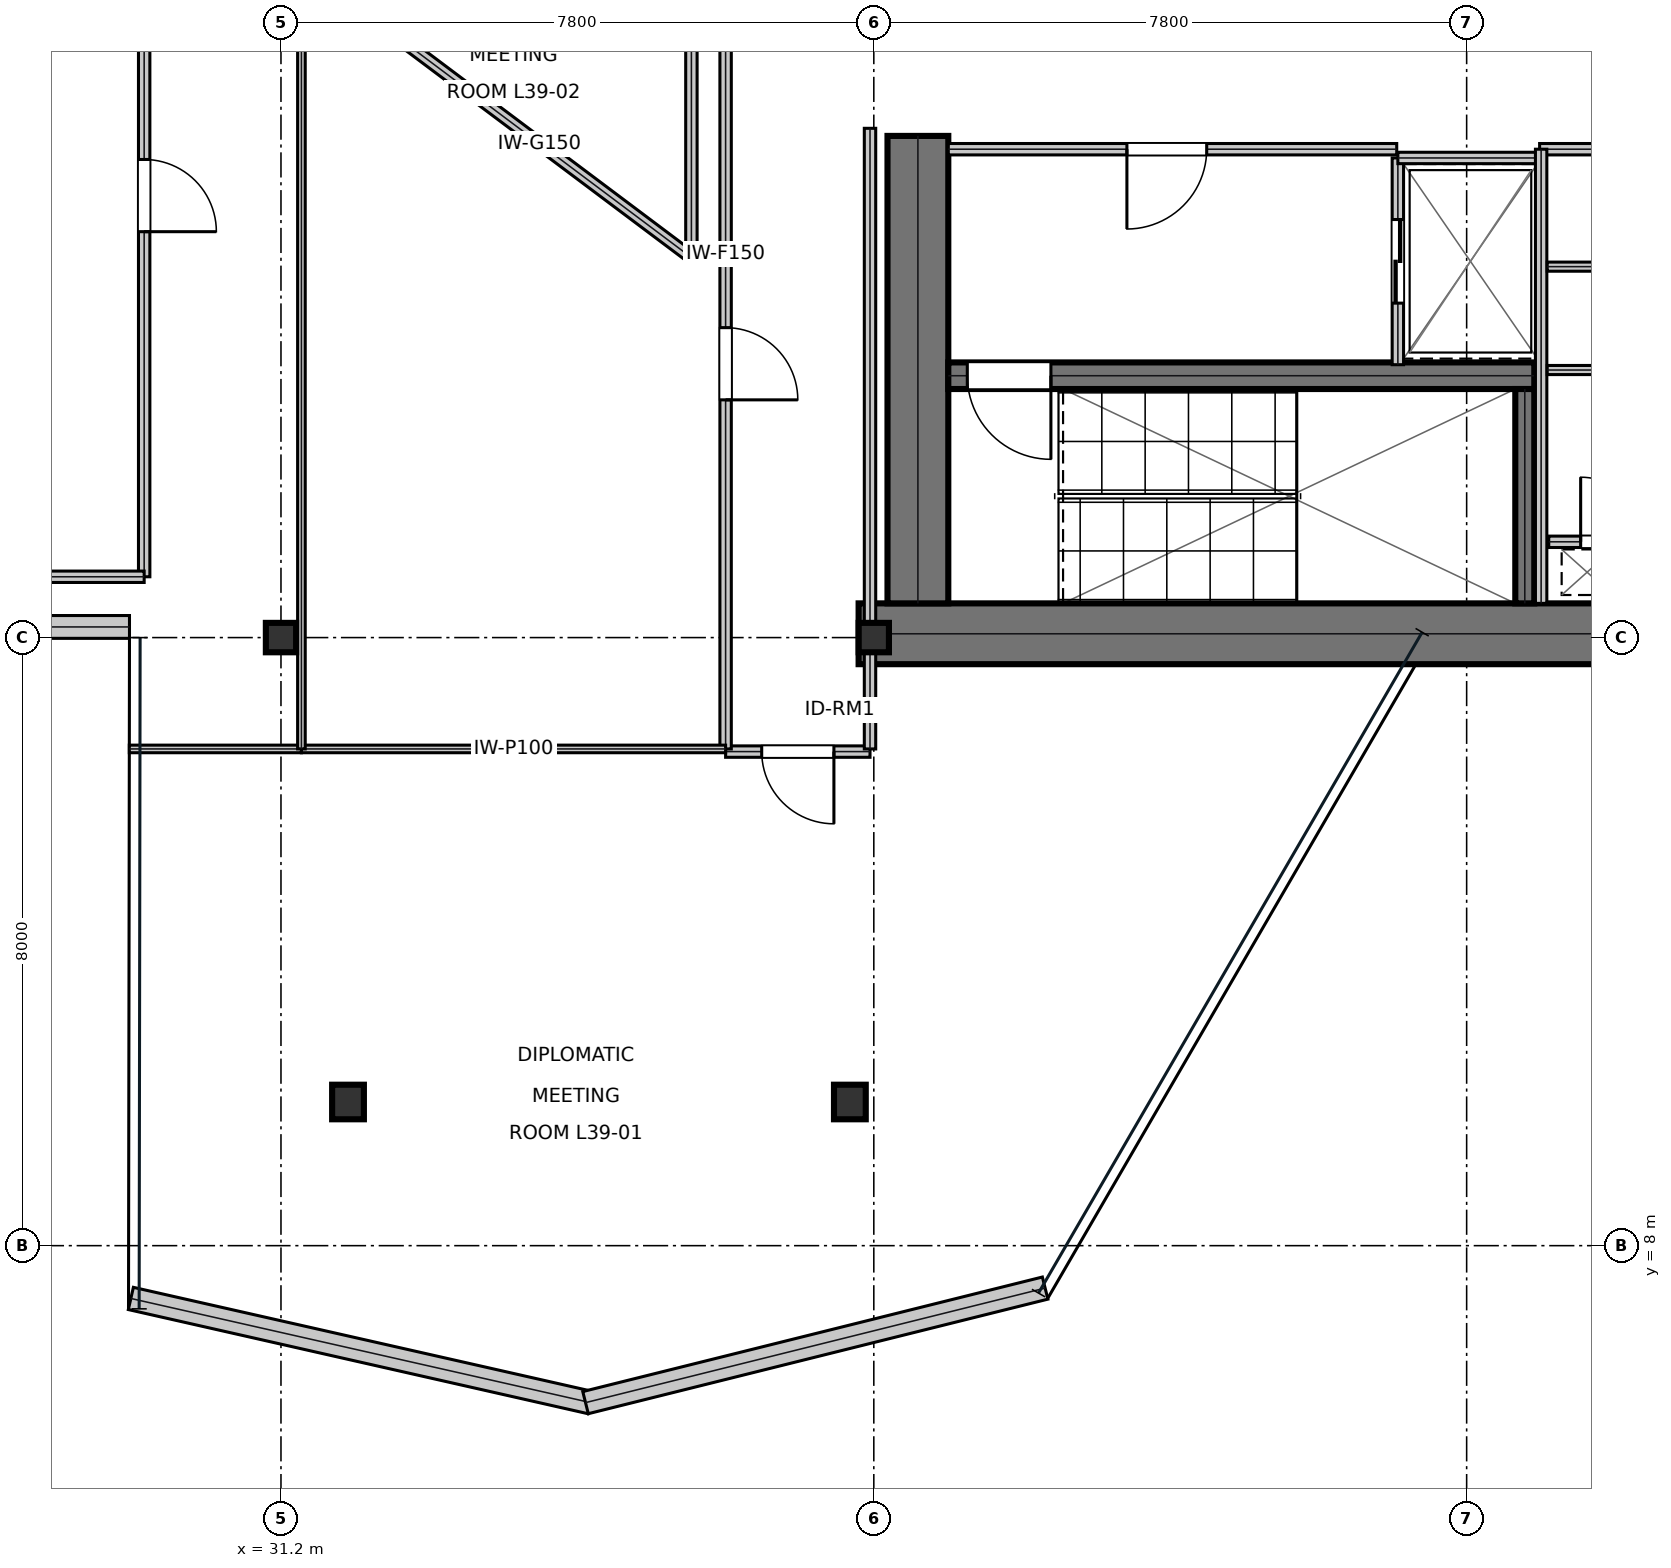
"""IFC4 building model, lengths in metres.
Left out: names, types, materials, properties, quantities, classifications, styles, units other than length and angle.
Written with IfcOpenShell. Run it as: python <this file> out.ifc"""

import sys

from ifc_helpers import new_model, si_unit, direction, frame, frame_2d, origin, origin_2d, place, context, subcontext, project, spatial, rectangle, i_section, extrude, element, fill, save


model = new_model("IFC4")
c1 = context("Model", 3, precision=1e-05, world=origin(), true_north=direction((0.0, 1.0)))
c2 = subcontext(c1, "Body", "Model", "MODEL_VIEW")
j1 = project(units=[si_unit("LENGTHUNIT", "METRE"), si_unit("PLANEANGLEUNIT", "RADIAN")], contexts=[c1])
p1 = place(None, origin())
s1 = spatial("IfcSite", under=j1, at=p1, CompositionType="ELEMENT")
p2 = place(p1, origin())
s2 = spatial("IfcBuilding", under=s1, at=p2, CompositionType="ELEMENT")
p3 = place(p2, frame((0.0, 0.0, 169.5)))
s3 = spatial("IfcBuildingStorey", under=s2, at=p3, CompositionType="ELEMENT", Elevation=169.5)
p4 = place(p3, frame((38.8, 16.05, 0.0), z_axis=(0.0, 0.0, 1.0), x_axis=(1.0, 0.0, 0.0)))
e1 = element("IfcWall", 1, at=p4, inside=s3, PredefinedType="SHEAR", context=c2, shape_type="SweptSolid", body=[
    extrude(rectangle(XDim=16.0, YDim=0.8, at=frame_2d((8.0, 0.0))), origin(), (0.0, 0.0, 1.0), 3.81),
])
p5 = place(p3, frame((39.58, 16.45, 0.0), z_axis=(0.0, 0.0, 1.0), x_axis=(0.0, 1.0, 0.0)))
e2 = element("IfcWall", 2, at=p5, inside=s3, PredefinedType="SHEAR", context=c2, shape_type="SweptSolid", body=[
    extrude(rectangle(XDim=6.15, YDim=0.8, at=frame_2d((3.075, 0.0))), origin(), (0.0, 0.0, 1.0), 3.81),
])
p6 = place(p3, frame((39.98, 19.445, 0.0), z_axis=(0.0, 0.0, 1.0), x_axis=(1.0, 0.0, 0.0)))
e3 = element("IfcWall", 3, at=p6, inside=s3, PredefinedType="SHEAR", context=c2, shape_type="SweptSolid", body=[
    extrude(rectangle(XDim=7.71, YDim=0.35, at=frame_2d((3.855, 0.0))), origin(), (0.0, 0.0, 1.0), 3.81),
])
p7 = place(p6, frame((0.25, 0.0, 0.0)))
e4 = element("IfcOpeningElement", 4, at=p7, cuts=e3, PredefinedType="OPENING", context=c2, shape_type="SweptSolid", body=[
    extrude(rectangle(XDim=1.1, YDim=2.15, at=frame_2d((0.55, 1.075))), frame((0.0, 0.185, 0.0), z_axis=(0.0, -1.0, 0.0), x_axis=(1.0, 0.0, 0.0)), (0.0, 0.0, 1.0), 0.37),
])
p8 = place(p3, frame((47.565, 16.45, 0.0), z_axis=(0.0, 0.0, 1.0), x_axis=(0.0, 1.0, 0.0)))
e5 = element("IfcWall", 5, at=p8, inside=s3, PredefinedType="SHEAR", context=c2, shape_type="SweptSolid", body=[
    extrude(rectangle(XDim=2.82, YDim=0.25, at=frame_2d((1.41, 0.0))), origin(), (0.0, 0.0, 1.0), 3.81),
])
for number, where, z_axis, x_axis in (
    (6, (31.2, 16.0, 0.0), (0.0, 0.0, 1.0), (1.0, 0.0, 0.0)),
    (7, (39.0, 16.0, 0.0), (0.0, 0.0, 1.0), (1.0, 0.0, 0.0)),
):
    element("IfcColumn", number, at=place(p3, frame(where, z_axis=z_axis, x_axis=x_axis)), inside=s3, PredefinedType="COLUMN", context=c2, shape_type="SweptSolid", body=[
        extrude(i_section(OverallWidth=0.398, OverallDepth=0.387, WebThickness=0.021, FlangeThickness=0.033, at=origin_2d()), origin(), (0.0, 0.0, 1.0), 4.044),
    ])
for number, where, z_axis, x_axis in (
    (8, (32.082, 9.89, 0.016), (0.0, 0.0, 1.0), (1.0, 0.0, 0.0)),
    (9, (38.685, 9.89, 0.016), (0.0, 0.0, 1.0), (1.0, 0.0, 0.0)),
):
    element("IfcColumn", number, at=place(p3, frame(where, z_axis=z_axis, x_axis=x_axis)), inside=s3, PredefinedType="COLUMN", context=c2, shape_type="SweptSolid", body=[
        extrude(i_section(OverallWidth=0.418, OverallDepth=0.455, WebThickness=0.042, FlangeThickness=0.068, at=origin_2d()), origin(), (0.0, 0.0, 1.0), 4.018),
    ])
p9 = place(p3, frame((26.408, 16.14, 0.0), z_axis=(0.0, 0.0, 1.0), x_axis=(1.0, 0.0, 0.0)))
e10 = element("IfcWall", 10, at=p9, inside=s3, PredefinedType="STANDARD", context=c2, shape_type="SweptSolid", body=[
    extrude(rectangle(XDim=2.799, YDim=0.3, at=frame_2d((1.399, 0.0))), origin(), (0.0, 0.0, 1.0), 3.81),
])
p10 = place(p3, frame((29.225, 7.305, 0.0), z_axis=(0.0, 0.0, 1.0), x_axis=(0.975288491541, -0.220935190199, 0.0)))
e11 = element("IfcWall", 11, at=p10, inside=s3, PredefinedType="STANDARD", context=c2, shape_type="SweptSolid", body=[
    extrude(rectangle(XDim=6.2, YDim=0.3, at=frame_2d((3.1, 0.0))), origin(), (0.0, 0.0, 1.0), 3.81),
])
p11 = place(p3, frame((35.207, 5.935, 0.0), z_axis=(0.0, 0.0, 1.0), x_axis=(0.970319679145, 0.241825805619, 0.0)))
e12 = element("IfcWall", 12, at=p11, inside=s3, PredefinedType="STANDARD", context=c2, shape_type="SweptSolid", body=[
    extrude(rectangle(XDim=6.232, YDim=0.3, at=frame_2d((3.116, 0.0))), origin(), (0.0, 0.0, 1.0), 3.81),
])
p12 = place(p3, frame((39.98, 22.425, 0.0), z_axis=(0.0, 0.0, 1.0), x_axis=(1.0, 0.0, 0.0)))
e13 = element("IfcWall", 13, at=p12, inside=s3, PredefinedType="PARTITIONING", context=c2, shape_type="SweptSolid", body=[
    extrude(rectangle(XDim=5.9, YDim=0.15, at=frame_2d((2.95, 0.0))), origin(), (0.0, 0.0, 1.0), 3.81),
])
p13 = place(p12, frame((2.35, 0.0, 0.0)))
e14 = element("IfcOpeningElement", 14, at=p13, cuts=e13, PredefinedType="OPENING", context=c2, shape_type="SweptSolid", body=[
    extrude(rectangle(XDim=1.05, YDim=2.15, at=frame_2d((0.525, 1.075))), frame((0.0, 0.085, 0.0), z_axis=(0.0, -1.0, 0.0), x_axis=(1.0, 0.0, 0.0)), (0.0, 0.0, 1.0), 0.17),
])
p14 = place(p3, frame((45.895, 19.59, 0.0), z_axis=(0.0, 0.0, 1.0), x_axis=(0.0, 1.0, 0.0)))
e15 = element("IfcWall", 15, at=p14, inside=s3, PredefinedType="PARTITIONING", context=c2, shape_type="SweptSolid", body=[
    extrude(rectangle(XDim=2.72, YDim=0.15, at=frame_2d((1.36, 0.0))), origin(), (0.0, 0.0, 1.0), 3.81),
])
p15 = place(p14, frame((0.81, 0.0, 0.0)))
e16 = element("IfcOpeningElement", 16, at=p15, cuts=e15, PredefinedType="OPENING", context=c2, shape_type="SweptSolid", body=[
    extrude(rectangle(XDim=1.1, YDim=2.15, at=frame_2d((0.55, 1.075))), frame((0.0, 0.085, 0.0), z_axis=(0.0, -1.0, 0.0), x_axis=(1.0, 0.0, 0.0)), (0.0, 0.0, 1.0), 0.17),
])
p16 = place(p3, frame((45.895, 22.31, 0.0), z_axis=(0.0, 0.0, 1.0), x_axis=(1.0, 0.0, 0.0)))
e17 = element("IfcWall", 17, at=p16, inside=s3, PredefinedType="PARTITIONING", context=c2, shape_type="SweptSolid", body=[
    extrude(rectangle(XDim=1.915, YDim=0.15, at=frame_2d((0.958, 0.0))), origin(), (0.0, 0.0, 1.0), 3.81),
])
p17 = place(p3, frame((47.88, 17.26, 0.0), z_axis=(0.0, 0.0, 1.0), x_axis=(1.0, 0.0, 0.0)))
e18 = element("IfcWall", 18, at=p17, inside=s3, PredefinedType="PARTITIONING", context=c2, shape_type="SweptSolid", body=[
    extrude(rectangle(XDim=1.72, YDim=0.15, at=frame_2d((0.86, 0.0))), origin(), (0.0, 0.0, 1.0), 3.81),
])
p18 = place(p17, frame((0.42, 0.0, 0.0)))
e19 = element("IfcOpeningElement", 19, at=p18, cuts=e18, PredefinedType="OPENING", context=c2, shape_type="SweptSolid", body=[
    extrude(rectangle(XDim=0.85, YDim=2.15, at=frame_2d((0.425, 1.075))), frame((0.0, 0.085, 0.0), z_axis=(0.0, -1.0, 0.0), x_axis=(1.0, 0.0, 0.0)), (0.0, 0.0, 1.0), 0.17),
])
p19 = place(p3, frame((47.76, 22.425, 0.0), z_axis=(0.0, 0.0, 1.0), x_axis=(1.0, 0.0, 0.0)))
e20 = element("IfcWall", 20, at=p19, inside=s3, PredefinedType="PARTITIONING", context=c2, shape_type="SweptSolid", body=[
    extrude(rectangle(XDim=1.96, YDim=0.15, at=frame_2d((0.98, 0.0))), origin(), (0.0, 0.0, 1.0), 3.81),
])
p20 = place(p3, frame((47.78, 16.45, 0.0), z_axis=(0.0, 0.0, 1.0), x_axis=(0.0, 1.0, 0.0)))
e21 = element("IfcWall", 21, at=p20, inside=s3, PredefinedType="PARTITIONING", context=c2, shape_type="SweptSolid", body=[
    extrude(rectangle(XDim=5.975, YDim=0.15, at=frame_2d((2.988, 0.0))), origin(), (0.0, 0.0, 1.0), 3.81),
])
for number, where, z_axis, x_axis in (
    (22, (47.86, 19.52, 0.0), (0.0, 0.0, 1.0), (1.0, 0.0, 0.0)),
    (23, (47.86, 20.88, 0.0), (0.0, 0.0, 1.0), (1.0, 0.0, 0.0)),
):
    element("IfcWall", number, at=place(p3, frame(where, z_axis=z_axis, x_axis=x_axis)), inside=s3, PredefinedType="PARTITIONING", context=c2, shape_type="SweptSolid", body=[
        extrude(rectangle(XDim=1.76, YDim=0.12, at=frame_2d((0.88, 0.0))), origin(), (0.0, 0.0, 1.0), 3.81),
    ])
p21 = place(p3, frame((37.05, 14.5, 0.0), z_axis=(0.0, 0.0, 1.0), x_axis=(1.0, 0.0, 0.0)))
e24 = element("IfcWall", 24, at=p21, inside=s3, PredefinedType="PARTITIONING", context=c2, shape_type="SweptSolid", body=[
    extrude(rectangle(XDim=1.9, YDim=0.15, at=frame_2d((0.95, 0.0))), origin(), (0.0, 0.0, 1.0), 3.19),
])
p22 = place(p21, frame((0.475, 0.0, 0.0)))
e25 = element("IfcOpeningElement", 25, at=p22, cuts=e24, PredefinedType="OPENING", context=c2, shape_type="SweptSolid", body=[
    extrude(rectangle(XDim=0.95, YDim=2.15, at=frame_2d((0.475, 1.075))), frame((0.0, 0.085, 0.0), z_axis=(0.0, -1.0, 0.0), x_axis=(1.0, 0.0, 0.0)), (0.0, 0.0, 1.0), 0.17),
])
p23 = place(p3, frame((37.05, 14.535, 0.0), z_axis=(0.0, 0.0, 1.0), x_axis=(0.0, 1.0, 0.0)))
e26 = element("IfcWall", 26, at=p23, inside=s3, PredefinedType="PARTITIONING", context=c2, shape_type="SweptSolid", body=[
    extrude(rectangle(XDim=13.015, YDim=0.15, at=frame_2d((6.508, 0.0))), origin(), (0.0, 0.0, 1.0), 3.19),
])
p24 = place(p23, frame((4.593, 0.0, 0.0)))
e27 = element("IfcOpeningElement", 27, at=p24, cuts=e26, PredefinedType="OPENING", context=c2, shape_type="SweptSolid", body=[
    extrude(rectangle(XDim=0.95, YDim=2.15, at=frame_2d((0.475, 1.075))), frame((0.0, 0.085, 0.0), z_axis=(0.0, -1.0, 0.0), x_axis=(1.0, 0.0, 0.0)), (0.0, 0.0, 1.0), 0.17),
])
p25 = place(p3, frame((29.4, 16.8, 0.0), z_axis=(0.0, 0.0, 1.0), x_axis=(0.0, 1.0, 0.0)))
e28 = element("IfcWall", 28, at=p25, inside=s3, PredefinedType="PARTITIONING", context=c2, shape_type="SweptSolid", body=[
    extrude(rectangle(XDim=10.75, YDim=0.15, at=frame_2d((5.375, 0.0))), origin(), (0.0, 0.0, 1.0), 3.19),
])
p26 = place(p25, frame((4.54, 0.0, 0.0)))
e29 = element("IfcOpeningElement", 29, at=p26, cuts=e28, PredefinedType="OPENING", context=c2, shape_type="SweptSolid", body=[
    extrude(rectangle(XDim=0.95, YDim=2.15, at=frame_2d((0.475, 1.075))), frame((0.0, 0.085, 0.0), z_axis=(0.0, -1.0, 0.0), x_axis=(1.0, 0.0, 0.0)), (0.0, 0.0, 1.0), 0.17),
])
p27 = place(p3, frame((38.95, 14.535, 0.0), z_axis=(0.0, 0.0, 1.0), x_axis=(0.0, 1.0, 0.0)))
e30 = element("IfcWall", 30, at=p27, inside=s3, PredefinedType="PARTITIONING", context=c2, shape_type="SweptSolid", body=[
    extrude(rectangle(XDim=8.165, YDim=0.15, at=frame_2d((4.083, 0.0))), origin(), (0.0, 0.0, 1.0), 3.19),
])
p28 = place(p3, frame((27.5, 16.8, 0.0), z_axis=(0.0, 0.0, 1.0), x_axis=(1.0, 0.0, 0.0)))
e31 = element("IfcWall", 31, at=p28, inside=s3, PredefinedType="PARTITIONING", context=c2, shape_type="SweptSolid", body=[
    extrude(rectangle(XDim=1.9, YDim=0.15, at=frame_2d((0.95, 0.0))), origin(), (0.0, 0.0, 1.0), 3.338),
])
p29 = place(p3, frame((31.469, 14.535, 0.0), z_axis=(0.0, 0.0, 1.0), x_axis=(1.0, 0.0, 0.0)))
e32 = element("IfcWall", 32, at=p29, inside=s3, PredefinedType="PARTITIONING", context=c2, shape_type="SweptSolid", body=[
    extrude(rectangle(XDim=5.581, YDim=0.1, at=frame_2d((2.791, 0.0))), origin(), (0.0, 0.0, 1.0), 3.81),
])
p30 = place(p3, frame((29.205, 14.535, 0.0), z_axis=(0.0, 0.0, 1.0), x_axis=(1.0, 0.0, 0.0)))
e33 = element("IfcWall", 33, at=p30, inside=s3, PredefinedType="PARTITIONING", context=c2, shape_type="SweptSolid", body=[
    extrude(rectangle(XDim=2.264, YDim=0.1, at=frame_2d((1.132, 0.0))), origin(), (0.0, 0.0, 1.0), 3.81),
])
p31 = place(p3, frame((31.469, 14.535, 0.0), z_axis=(0.0, 0.0, 1.0), x_axis=(0.0, 1.0, 0.0)))
e34 = element("IfcWall", 34, at=p31, inside=s3, PredefinedType="PARTITIONING", context=c2, shape_type="SweptSolid", body=[
    extrude(rectangle(XDim=13.015, YDim=0.1, at=frame_2d((6.508, 0.0))), origin(), (0.0, 0.0, 1.0), 3.19),
])
p32 = place(p3, frame((32.6, 24.0, 0.0), z_axis=(0.0, 0.0, 1.0), x_axis=(0.8, -0.6, 0.0)))
e35 = element("IfcWall", 35, at=p32, inside=s3, PredefinedType="MOVABLE", context=c2, shape_type="SweptSolid", body=[
    extrude(rectangle(XDim=5.0, YDim=0.15, at=frame_2d((2.5, 0.0))), origin(), (0.0, 0.0, 1.0), 3.81),
])
p33 = place(p3, frame((36.6, 21.0, 0.0), z_axis=(0.0, 0.0, 1.0), x_axis=(0.0, 1.0, 0.0)))
e36 = element("IfcWall", 36, at=p33, inside=s3, PredefinedType="MOVABLE", context=c2, shape_type="SweptSolid", body=[
    extrude(rectangle(XDim=6.0, YDim=0.15, at=frame_2d((3.0, 0.0))), origin(), (0.0, 0.0, 1.0), 3.81),
])
p34 = place(p13, frame((1.05, 0.0, 0.0), z_axis=(0.0, 0.0, 1.0), x_axis=(-1.0, 0.0, 0.0)))
e37 = element("IfcDoor", 37, at=p34, inside=s3, OperationType="SINGLE_SWING_RIGHT", PredefinedType="DOOR", context=c2, shape_type="SweptSolid", body=[
    extrude(rectangle(XDim=1.05, YDim=2.15, at=frame_2d((0.525, 1.075))), frame((0.0, 0.025, 0.0), z_axis=(0.0, -1.0, 0.0), x_axis=(1.0, 0.0, 0.0)), (0.0, 0.0, 1.0), 0.05),
])
fill(e14, e37)
p35 = place(p15, frame((1.1, 0.0, 0.0), z_axis=(0.0, 0.0, 1.0), x_axis=(-1.0, 0.0, 0.0)))
e38 = element("IfcDoor", 38, at=p35, inside=s3, OperationType="DOUBLE_DOOR_SLIDING", PredefinedType="DOOR", context=c2, shape_type="SweptSolid", body=[
    extrude(rectangle(XDim=1.1, YDim=2.15, at=frame_2d((0.55, 1.075))), frame((0.0, 0.025, 0.0), z_axis=(0.0, -1.0, 0.0), x_axis=(1.0, 0.0, 0.0)), (0.0, 0.0, 1.0), 0.05),
])
fill(e16, e38)
p36 = place(p18, origin())
e39 = element("IfcDoor", 39, at=p36, inside=s3, OperationType="SINGLE_SWING_LEFT", PredefinedType="TRAPDOOR", context=c2, shape_type="SweptSolid", body=[
    extrude(rectangle(XDim=0.85, YDim=2.15, at=frame_2d((0.425, 1.075))), frame((0.0, 0.025, 0.0), z_axis=(0.0, -1.0, 0.0), x_axis=(1.0, 0.0, 0.0)), (0.0, 0.0, 1.0), 0.05),
])
fill(e19, e39)
p37 = place(p22, frame((0.95, 0.0, 0.0), z_axis=(0.0, 0.0, 1.0), x_axis=(-1.0, 0.0, 0.0)))
e40 = element("IfcDoor", 40, at=p37, inside=s3, OperationType="SINGLE_SWING_LEFT", PredefinedType="DOOR", context=c2, shape_type="SweptSolid", body=[
    extrude(rectangle(XDim=0.95, YDim=2.15, at=frame_2d((0.475, 1.075))), frame((0.0, 0.025, 0.0), z_axis=(0.0, -1.0, 0.0), x_axis=(1.0, 0.0, 0.0)), (0.0, 0.0, 1.0), 0.05),
])
fill(e25, e40)
p38 = place(p24, frame((0.95, 0.0, 0.0), z_axis=(0.0, 0.0, 1.0), x_axis=(-1.0, 0.0, 0.0)))
e41 = element("IfcDoor", 41, at=p38, inside=s3, OperationType="SINGLE_SWING_RIGHT", PredefinedType="DOOR", context=c2, shape_type="SweptSolid", body=[
    extrude(rectangle(XDim=0.95, YDim=2.15, at=frame_2d((0.475, 1.075))), frame((0.0, 0.025, 0.0), z_axis=(0.0, -1.0, 0.0), x_axis=(1.0, 0.0, 0.0)), (0.0, 0.0, 1.0), 0.05),
])
fill(e27, e41)
p39 = place(p26, frame((0.95, 0.0, 0.0), z_axis=(0.0, 0.0, 1.0), x_axis=(-1.0, 0.0, 0.0)))
e42 = element("IfcDoor", 42, at=p39, inside=s3, OperationType="SINGLE_SWING_RIGHT", PredefinedType="DOOR", context=c2, shape_type="SweptSolid", body=[
    extrude(rectangle(XDim=0.95, YDim=2.15, at=frame_2d((0.475, 1.075))), frame((0.0, 0.025, 0.0), z_axis=(0.0, -1.0, 0.0), x_axis=(1.0, 0.0, 0.0)), (0.0, 0.0, 1.0), 0.05),
])
fill(e29, e42)
p40 = place(p7, frame((1.1, 0.0, 0.0), z_axis=(0.0, 0.0, 1.0), x_axis=(-1.0, 0.0, 0.0)))
e43 = element("IfcDoor", 43, at=p40, inside=s3, OperationType="SINGLE_SWING_LEFT", PredefinedType="DOOR", context=c2, shape_type="SweptSolid", body=[
    extrude(rectangle(XDim=1.1, YDim=2.15, at=frame_2d((0.55, 1.075))), frame((0.0, 0.025, 0.0), z_axis=(0.0, -1.0, 0.0), x_axis=(1.0, 0.0, 0.0)), (0.0, 0.0, 1.0), 0.05),
])
fill(e4, e43)
save(model, sys.argv[1])
